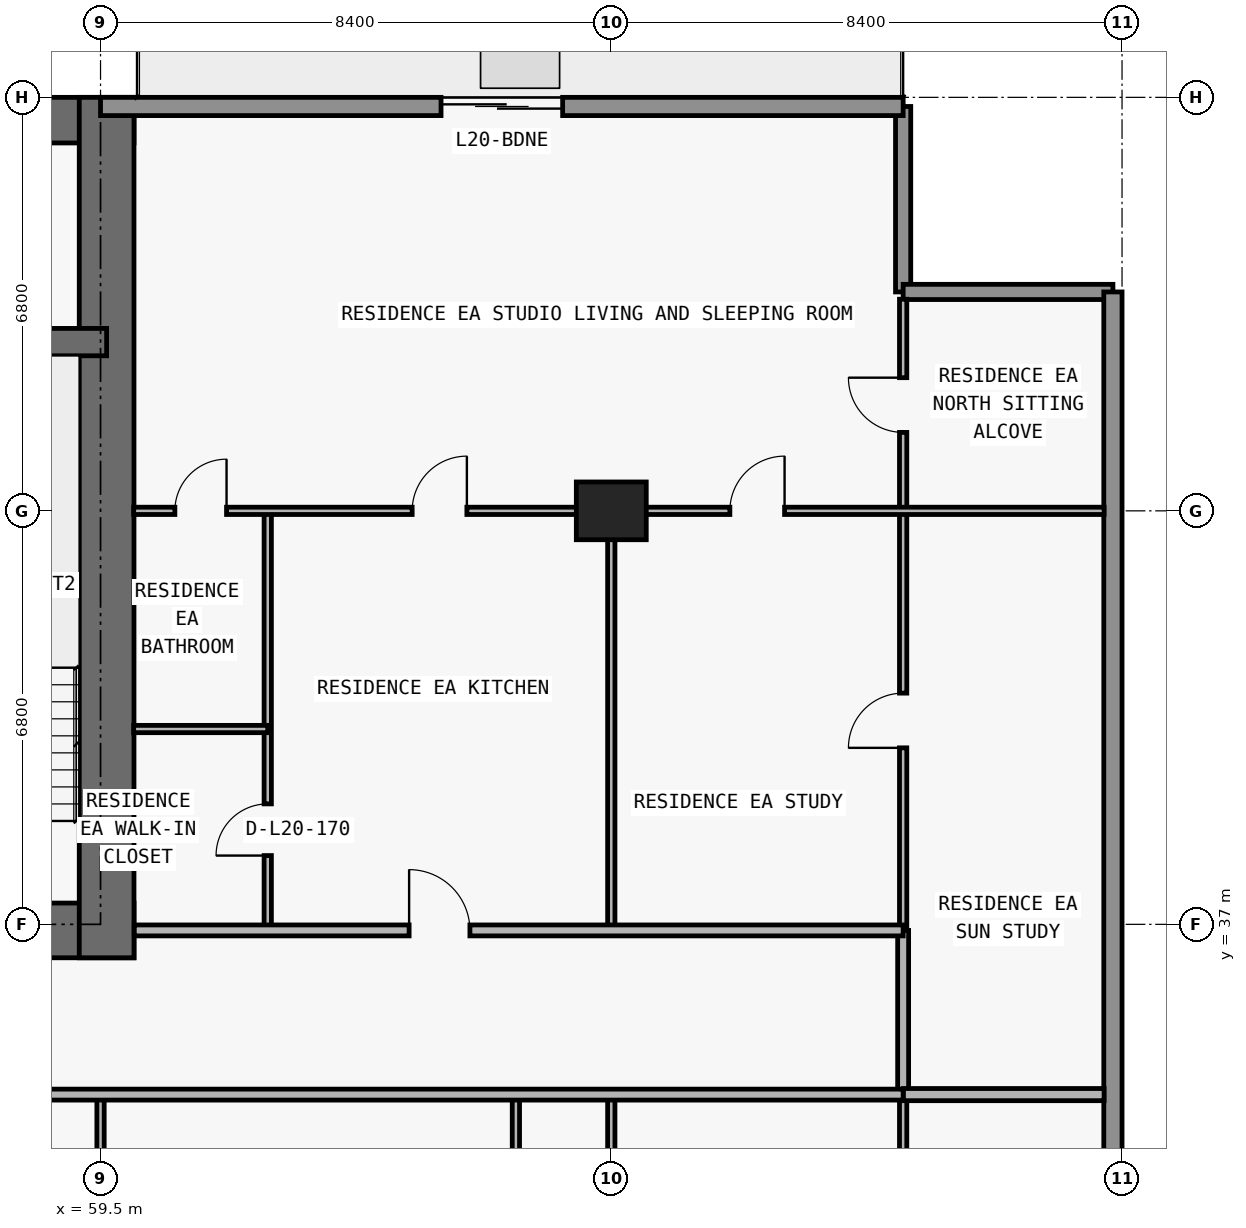
"""IFC4 building model, lengths in metres.
Left out: names, types, materials, properties, quantities, classifications, styles, units other than length and angle.
Written with IfcOpenShell. Run it as: python <this file> out.ifc"""

import sys

from ifc_helpers import new_model, si_unit, direction, frame, frame_2d, origin, origin_2d, place, context, subcontext, project, spatial, rectangle, extrude, element, fill, save


model = new_model("IFC4")
c1 = context("Model", 3, precision=1e-05, world=origin(), true_north=direction((0.0, 1.0)))
c2 = subcontext(c1, "Body", "Model", "MODEL_VIEW")
j1 = project(units=[si_unit("LENGTHUNIT", "METRE"), si_unit("PLANEANGLEUNIT", "RADIAN")], contexts=[c1])
p1 = place(None, origin())
s1 = spatial("IfcSite", under=j1, at=p1, CompositionType="ELEMENT")
p2 = place(p1, origin())
s2 = spatial("IfcBuilding", under=s1, at=p2, CompositionType="ELEMENT")
p3 = place(p2, frame((0.0, 0.0, 76.2)))
s3 = spatial("IfcBuildingStorey", under=s2, at=p3, CompositionType="ELEMENT", Elevation=76.2)
p4 = place(p3, frame((67.9, 43.8, 0.0), z_axis=(0.0, 0.0, 1.0), x_axis=(1.0, 0.0, 0.0)))
e1 = element("IfcColumn", 1, at=p4, inside=s3, PredefinedType="COLUMN", context=c2, shape_type="SweptSolid", body=[
    extrude(rectangle(XDim=1.15, YDim=0.95, at=origin_2d()), origin(), (0.0, 0.0, 1.0), 3.0),
])
p5 = place(p3, frame((17.75, 36.9, 0.0), z_axis=(0.0, 0.0, 1.0), x_axis=(1.0, 0.0, 0.0)))
e2 = element("IfcWall", 2, at=p5, inside=s3, PredefinedType="SHEAR", context=c2, shape_type="SweptSolid", body=[
    extrude(rectangle(XDim=42.3, YDim=0.9, at=frame_2d((21.15, 0.0))), origin(), (0.0, 0.0, 1.0), 3.0),
])
p6 = place(p5, frame((14.55, 0.0, 0.0)))
e3 = element("IfcOpeningElement", 3, at=p6, cuts=e2, PredefinedType="OPENING", context=c2, shape_type="SweptSolid", body=[
    extrude(rectangle(XDim=1.1, YDim=2.15, at=frame_2d((0.55, 1.075))), frame((0.0, 0.46, 0.0), z_axis=(0.0, -1.0, 0.0), x_axis=(1.0, 0.0, 0.0)), (0.0, 0.0, 1.0), 0.92),
])
p7 = place(p5, frame((6.4, 0.0, 0.0)))
e4 = element("IfcOpeningElement", 4, at=p7, cuts=e2, PredefinedType="OPENING", context=c2, shape_type="SweptSolid", body=[
    extrude(rectangle(XDim=1.05, YDim=2.15, at=frame_2d((0.525, 1.075))), frame((0.0, 0.46, 0.0), z_axis=(0.0, -1.0, 0.0), x_axis=(1.0, 0.0, 0.0)), (0.0, 0.0, 1.0), 0.92),
])
p8 = place(p5, frame((34.9, 0.0, 0.0)))
e5 = element("IfcOpeningElement", 5, at=p8, cuts=e2, PredefinedType="OPENING", context=c2, shape_type="SweptSolid", body=[
    extrude(rectangle(XDim=1.05, YDim=2.15, at=frame_2d((0.525, 1.075))), frame((0.0, 0.46, 0.0), z_axis=(0.0, -1.0, 0.0), x_axis=(1.0, 0.0, 0.0)), (0.0, 0.0, 1.0), 0.92),
])
p9 = place(p5, frame((11.012, 0.0, 0.0)))
e6 = element("IfcOpeningElement", 6, at=p9, cuts=e2, PredefinedType="OPENING", context=c2, shape_type="SweptSolid", body=[
    extrude(rectangle(XDim=1.05, YDim=2.15, at=frame_2d((0.525, 1.075))), frame((0.0, 0.46, 0.0), z_axis=(0.0, -1.0, 0.0), x_axis=(1.0, 0.0, 0.0)), (0.0, 0.0, 1.0), 0.92),
])
p10 = place(p5, frame((24.25, 0.0, 0.0)))
e7 = element("IfcOpeningElement", 7, at=p10, cuts=e2, PredefinedType="OPENING", context=c2, shape_type="SweptSolid", body=[
    extrude(rectangle(XDim=1.05, YDim=2.15, at=frame_2d((0.525, 1.075))), frame((0.0, 0.46, 0.0), z_axis=(0.0, -1.0, 0.0), x_axis=(1.0, 0.0, 0.0)), (0.0, 0.0, 1.0), 0.92),
])
p11 = place(p3, frame((17.75, 50.225, 0.0), z_axis=(0.0, 0.0, 1.0), x_axis=(1.0, 0.0, 0.0)))
e8 = element("IfcWall", 8, at=p11, inside=s3, PredefinedType="SHEAR", context=c2, shape_type="SweptSolid", body=[
    extrude(rectangle(XDim=42.3, YDim=0.75, at=frame_2d((21.15, 0.0))), origin(), (0.0, 0.0, 1.0), 3.0),
])
p12 = place(p3, frame((59.6, 36.45, 0.0), z_axis=(0.0, 0.0, 1.0), x_axis=(0.0, 1.0, 0.0)))
e9 = element("IfcWall", 9, at=p12, inside=s3, PredefinedType="SHEAR", context=c2, shape_type="SweptSolid", body=[
    extrude(rectangle(XDim=14.15, YDim=0.9, at=frame_2d((7.075, 0.0))), origin(), (0.0, 0.0, 1.0), 3.0),
])
p13 = place(p3, frame((18.2, 46.575, 0.0), z_axis=(0.0, 0.0, 1.0), x_axis=(1.0, 0.0, 0.0)))
e10 = element("IfcWall", 10, at=p13, inside=s3, PredefinedType="SHEAR", context=c2, shape_type="SweptSolid", body=[
    extrude(rectangle(XDim=41.4, YDim=0.45, at=frame_2d((20.7, 0.0))), origin(), (0.0, 0.0, 1.0), 3.0),
])
p14 = place(p13, frame((7.7, 0.0, 0.0)))
e11 = element("IfcOpeningElement", 11, at=p14, cuts=e10, PredefinedType="OPENING", context=c2, shape_type="SweptSolid", body=[
    extrude(rectangle(XDim=1.0, YDim=2.2, at=frame_2d((0.5, 1.1))), frame((0.0, 0.235, 0.0), z_axis=(0.0, -1.0, 0.0), x_axis=(1.0, 0.0, 0.0)), (0.0, 0.0, 1.0), 0.47),
])
p15 = place(p13, frame((32.725, 0.0, 0.0)))
e12 = element("IfcOpeningElement", 12, at=p15, cuts=e10, PredefinedType="OPENING", context=c2, shape_type="SweptSolid", body=[
    extrude(rectangle(XDim=1.05, YDim=2.15, at=frame_2d((0.525, 1.075))), frame((0.0, 0.235, 0.0), z_axis=(0.0, -1.0, 0.0), x_axis=(1.0, 0.0, 0.0)), (0.0, 0.0, 1.0), 0.47),
])
p16 = place(p3, frame((72.7, 50.45, 0.0), z_axis=(0.0, 0.0, 1.0), x_axis=(0.0, -1.0, 0.0)))
e13 = element("IfcWall", 13, at=p16, inside=s3, PredefinedType="ELEMENTEDWALL", context=c2, shape_type="SweptSolid", body=[
    extrude(rectangle(XDim=3.05, YDim=0.25, at=frame_2d((1.525, 0.0))), origin(), (0.0, 0.0, 1.0), 3.0),
])
p17 = place(p3, frame((72.7, 47.4, 0.0), z_axis=(0.0, 0.0, 1.0), x_axis=(1.0, 0.0, 0.0)))
e14 = element("IfcWall", 14, at=p17, inside=s3, PredefinedType="ELEMENTEDWALL", context=c2, shape_type="SweptSolid", body=[
    extrude(rectangle(XDim=3.45, YDim=0.25, at=frame_2d((1.725, 0.0))), origin(), (0.0, 0.0, 1.0), 3.0),
])
p18 = place(p3, frame((76.15, 47.4, 0.0), z_axis=(0.0, 0.0, 1.0), x_axis=(0.0, -1.0, 0.0)))
e15 = element("IfcWall", 15, at=p18, inside=s3, PredefinedType="STANDARD", context=c2, shape_type="SweptSolid", body=[
    extrude(rectangle(XDim=20.6, YDim=0.3, at=frame_2d((10.3, 0.0))), origin(), (0.0, 0.0, 1.0), 3.0),
])
p19 = place(p3, frame((59.5, 50.45, 0.0), z_axis=(0.0, 0.0, 1.0), x_axis=(1.0, 0.0, 0.0)))
e16 = element("IfcWall", 16, at=p19, inside=s3, PredefinedType="STANDARD", context=c2, shape_type="SweptSolid", body=[
    extrude(rectangle(XDim=13.2, YDim=0.3, at=frame_2d((6.6, 0.0))), origin(), (0.0, 0.0, 1.0), 3.0),
])
p20 = place(p19, frame((5.6, 0.0, 0.0)))
e17 = element("IfcOpeningElement", 17, at=p20, cuts=e16, PredefinedType="OPENING", context=c2, shape_type="SweptSolid", body=[
    extrude(rectangle(XDim=2.0, YDim=2.3, at=frame_2d((1.0, 1.15))), frame((0.0, 0.16, 0.0), z_axis=(0.0, -1.0, 0.0), x_axis=(1.0, 0.0, 0.0)), (0.0, 0.0, 1.0), 0.32),
])
p21 = place(p3, frame((59.5, 6.24, 0.0), z_axis=(0.0, 0.0, 1.0), x_axis=(0.0, 1.0, 0.0)))
e18 = element("IfcWall", 18, at=p21, inside=s3, PredefinedType="PARTITIONING", context=c2, shape_type="SweptSolid", body=[
    extrude(rectangle(XDim=27.96, YDim=0.12, at=frame_2d((13.98, 0.0))), origin(), (0.0, 0.0, 1.0), 2.06),
])
p22 = place(p21, frame((19.19, 0.0, 0.0)))
e19 = element("IfcOpeningElement", 19, at=p22, cuts=e18, PredefinedType="OPENING", context=c2, shape_type="SweptSolid", body=[
    extrude(rectangle(XDim=0.9, YDim=2.01, at=frame_2d((0.45, 1.005))), frame((0.0, 0.07, 0.0), z_axis=(0.0, -1.0, 0.0), x_axis=(1.0, 0.0, 0.0)), (0.0, 0.0, 1.0), 0.14),
])
p23 = place(p3, frame((62.25, 36.9, 0.0), z_axis=(0.0, 0.0, 1.0), x_axis=(0.0, 1.0, 0.0)))
e20 = element("IfcWall", 20, at=p23, inside=s3, PredefinedType="PARTITIONING", context=c2, shape_type="SweptSolid", body=[
    extrude(rectangle(XDim=6.9, YDim=0.12, at=frame_2d((3.45, 0.0))), origin(), (0.0, 0.0, 1.0), 2.436),
])
p24 = place(p23, frame((1.231, 0.0, 0.0)))
e21 = element("IfcOpeningElement", 21, at=p24, cuts=e20, PredefinedType="OPENING", context=c2, shape_type="SweptSolid", body=[
    extrude(rectangle(XDim=0.85, YDim=2.1, at=frame_2d((0.425, 1.05))), frame((0.0, 0.07, 0.0), z_axis=(0.0, -1.0, 0.0), x_axis=(1.0, 0.0, 0.0)), (0.0, 0.0, 1.0), 0.14),
])
p25 = place(p3, frame((66.331, 28.08, 0.0), z_axis=(0.0, 0.0, 1.0), x_axis=(0.0, 1.0, 0.0)))
e22 = element("IfcWall", 22, at=p25, inside=s3, PredefinedType="PARTITIONING", context=c2, shape_type="SweptSolid", body=[
    extrude(rectangle(XDim=6.12, YDim=0.12, at=frame_2d((3.06, 0.0))), origin(), (0.0, 0.0, 1.0), 3.0),
])
p26 = place(p25, frame((2.635, 0.0, 0.0)))
e23 = element("IfcOpeningElement", 23, at=p26, cuts=e22, PredefinedType="OPENING", context=c2, shape_type="SweptSolid", body=[
    extrude(rectangle(XDim=0.85, YDim=2.1, at=frame_2d((0.425, 1.05))), frame((0.0, 0.07, 0.0), z_axis=(0.0, -1.0, 0.0), x_axis=(1.0, 0.0, 0.0)), (0.0, 0.0, 1.0), 0.14),
])
p27 = place(p3, frame((67.9, 6.24, 0.0), z_axis=(0.0, 0.0, 1.0), x_axis=(0.0, 1.0, 0.0)))
e24 = element("IfcWall", 24, at=p27, inside=s3, PredefinedType="PARTITIONING", context=c2, shape_type="SweptSolid", body=[
    extrude(rectangle(XDim=27.96, YDim=0.12, at=frame_2d((13.98, 0.0))), origin(), (0.0, 0.0, 1.0), 2.06),
])
p28 = place(p27, frame((19.19, 0.0, 0.0)))
e25 = element("IfcOpeningElement", 25, at=p28, cuts=e24, PredefinedType="OPENING", context=c2, shape_type="SweptSolid", body=[
    extrude(rectangle(XDim=0.9, YDim=2.01, at=frame_2d((0.45, 1.005))), frame((0.0, 0.07, 0.0), z_axis=(0.0, -1.0, 0.0), x_axis=(1.0, 0.0, 0.0)), (0.0, 0.0, 1.0), 0.14),
])
p29 = place(p3, frame((67.9, 36.9, 0.0), z_axis=(0.0, 0.0, 1.0), x_axis=(0.0, 1.0, 0.0)))
e26 = element("IfcWall", 26, at=p29, inside=s3, PredefinedType="PARTITIONING", context=c2, shape_type="SweptSolid", body=[
    extrude(rectangle(XDim=6.9, YDim=0.12, at=frame_2d((3.45, 0.0))), origin(), (0.0, 0.0, 1.0), 2.06),
])
p30 = place(p3, frame((72.7, 6.32, 0.0), z_axis=(0.0, 0.0, 1.0), x_axis=(0.0, 1.0, 0.0)))
e27 = element("IfcWall", 27, at=p30, inside=s3, PredefinedType="PARTITIONING", context=c2, shape_type="SweptSolid", body=[
    extrude(rectangle(XDim=27.88, YDim=0.12, at=frame_2d((13.94, 0.0))), origin(), (0.0, 0.0, 1.0), 3.0),
])
p31 = place(p30, frame((13.49, 0.0, 0.0)))
e28 = element("IfcOpeningElement", 28, at=p31, cuts=e27, PredefinedType="OPENING", context=c2, shape_type="SweptSolid", body=[
    extrude(rectangle(XDim=0.9, YDim=2.15, at=frame_2d((0.45, 1.075))), frame((0.0, 0.07, 0.0), z_axis=(0.0, -1.0, 0.0), x_axis=(1.0, 0.0, 0.0)), (0.0, 0.0, 1.0), 0.14),
])
p32 = place(p3, frame((72.7, 34.205, 0.0), z_axis=(0.0, 0.0, 1.0), x_axis=(0.0, 1.0, 0.0)))
e29 = element("IfcWall", 29, at=p32, inside=s3, PredefinedType="PARTITIONING", context=c2, shape_type="SweptSolid", body=[
    extrude(rectangle(XDim=2.695, YDim=0.18, at=frame_2d((1.347, 0.0))), origin(), (0.0, 0.0, 1.0), 3.0),
])
p33 = place(p3, frame((72.7, 36.905, 0.0), z_axis=(0.0, 0.0, 1.0), x_axis=(0.0, 1.0, 0.0)))
e30 = element("IfcWall", 30, at=p33, inside=s3, PredefinedType="PARTITIONING", context=c2, shape_type="SweptSolid", body=[
    extrude(rectangle(XDim=10.375, YDim=0.12, at=frame_2d((5.188, 0.0))), origin(), (0.0, 0.0, 1.0), 3.0),
])
p34 = place(p33, frame((2.998, 0.0, 0.0)))
e31 = element("IfcOpeningElement", 31, at=p34, cuts=e30, PredefinedType="OPENING", context=c2, shape_type="SweptSolid", body=[
    extrude(rectangle(XDim=0.9, YDim=2.15, at=frame_2d((0.45, 1.075))), frame((0.0, 0.07, 0.0), z_axis=(0.0, -1.0, 0.0), x_axis=(1.0, 0.0, 0.0)), (0.0, 0.0, 1.0), 0.14),
])
p35 = place(p33, frame((8.185, 0.0, 0.0)))
e32 = element("IfcOpeningElement", 32, at=p35, cuts=e30, PredefinedType="OPENING", context=c2, shape_type="SweptSolid", body=[
    extrude(rectangle(XDim=0.9, YDim=2.15, at=frame_2d((0.45, 1.075))), frame((0.0, 0.07, 0.0), z_axis=(0.0, -1.0, 0.0), x_axis=(1.0, 0.0, 0.0)), (0.0, 0.0, 1.0), 0.14),
])
p36 = place(p3, frame((5.105, 34.2, 0.0), z_axis=(0.0, 0.0, 1.0), x_axis=(1.0, 0.0, 0.0)))
e33 = element("IfcWall", 33, at=p36, inside=s3, PredefinedType="PARTITIONING", context=c2, shape_type="SweptSolid", body=[
    extrude(rectangle(XDim=67.595, YDim=0.18, at=frame_2d((33.797, 0.0))), origin(), (0.0, 0.0, 1.0), 3.0),
])
p37 = place(p36, frame((7.639, 0.0, 0.0)))
e34 = element("IfcOpeningElement", 34, at=p37, cuts=e33, PredefinedType="OPENING", context=c2, shape_type="SweptSolid", body=[
    extrude(rectangle(XDim=1.0, YDim=2.2, at=frame_2d((0.5, 1.1))), frame((0.0, 0.1, 0.0), z_axis=(0.0, -1.0, 0.0), x_axis=(1.0, 0.0, 0.0)), (0.0, 0.0, 1.0), 0.2),
])
p38 = place(p36, frame((24.423, 0.0, 0.0)))
e35 = element("IfcOpeningElement", 35, at=p38, cuts=e33, PredefinedType="OPENING", context=c2, shape_type="SweptSolid", body=[
    extrude(rectangle(XDim=1.0, YDim=2.2, at=frame_2d((0.5, 1.1))), frame((0.0, 0.1, 0.0), z_axis=(0.0, -1.0, 0.0), x_axis=(1.0, 0.0, 0.0)), (0.0, 0.0, 1.0), 0.2),
])
p39 = place(p36, frame((48.825, 0.0, 0.0)))
e36 = element("IfcOpeningElement", 36, at=p39, cuts=e33, PredefinedType="OPENING", context=c2, shape_type="SweptSolid", body=[
    extrude(rectangle(XDim=1.0, YDim=2.2, at=frame_2d((0.5, 1.1))), frame((0.0, 0.1, 0.0), z_axis=(0.0, -1.0, 0.0), x_axis=(1.0, 0.0, 0.0)), (0.0, 0.0, 1.0), 0.2),
])
p40 = place(p3, frame((72.705, 34.2, 0.0), z_axis=(0.0, 0.0, 1.0), x_axis=(1.0, 0.0, 0.0)))
e37 = element("IfcWall", 37, at=p40, inside=s3, PredefinedType="PARTITIONING", context=c2, shape_type="SweptSolid", body=[
    extrude(rectangle(XDim=3.3, YDim=0.2, at=frame_2d((1.65, 0.0))), origin(), (0.0, 0.0, 1.0), 3.0),
])
p41 = place(p3, frame((60.055, 36.9, 0.0), z_axis=(0.0, 0.0, 1.0), x_axis=(1.0, 0.0, 0.0)))
e38 = element("IfcWall", 38, at=p41, inside=s3, PredefinedType="PARTITIONING", context=c2, shape_type="SweptSolid", body=[
    extrude(rectangle(XDim=12.645, YDim=0.18, at=frame_2d((6.323, 0.0))), origin(), (0.0, 0.0, 1.0), 3.0),
])
p42 = place(p41, frame((4.52, 0.0, 0.0)))
e39 = element("IfcOpeningElement", 39, at=p42, cuts=e38, PredefinedType="OPENING", context=c2, shape_type="SweptSolid", body=[
    extrude(rectangle(XDim=1.0, YDim=2.2, at=frame_2d((0.5, 1.1))), frame((0.0, 0.1, 0.0), z_axis=(0.0, -1.0, 0.0), x_axis=(1.0, 0.0, 0.0)), (0.0, 0.0, 1.0), 0.2),
])
p43 = place(p3, frame((60.045, 40.212, 0.0), z_axis=(0.0, 0.0, 1.0), x_axis=(1.0, 0.0, 0.0)))
e40 = element("IfcWall", 40, at=p43, inside=s3, PredefinedType="PARTITIONING", context=c2, shape_type="SweptSolid", body=[
    extrude(rectangle(XDim=2.205, YDim=0.12, at=frame_2d((1.103, 0.0))), origin(), (0.0, 0.0, 1.0), 3.0),
])
p44 = place(p3, frame((60.045, 43.8, 0.0), z_axis=(0.0, 0.0, 1.0), x_axis=(1.0, 0.0, 0.0)))
e41 = element("IfcWall", 41, at=p44, inside=s3, PredefinedType="PARTITIONING", context=c2, shape_type="SweptSolid", body=[
    extrude(rectangle(XDim=15.96, YDim=0.12, at=frame_2d((7.98, 0.0))), origin(), (0.0, 0.0, 1.0), 2.289),
])
p45 = place(p44, frame((9.805, 0.0, 0.0)))
e42 = element("IfcOpeningElement", 42, at=p45, cuts=e41, PredefinedType="OPENING", context=c2, shape_type="SweptSolid", body=[
    extrude(rectangle(XDim=0.9, YDim=2.15, at=frame_2d((0.45, 1.075))), frame((0.0, 0.07, 0.0), z_axis=(0.0, -1.0, 0.0), x_axis=(1.0, 0.0, 0.0)), (0.0, 0.0, 1.0), 0.14),
])
p46 = place(p44, frame((4.58, 0.0, 0.0)))
e43 = element("IfcOpeningElement", 43, at=p46, cuts=e41, PredefinedType="OPENING", context=c2, shape_type="SweptSolid", body=[
    extrude(rectangle(XDim=0.9, YDim=2.15, at=frame_2d((0.45, 1.075))), frame((0.0, 0.07, 0.0), z_axis=(0.0, -1.0, 0.0), x_axis=(1.0, 0.0, 0.0)), (0.0, 0.0, 1.0), 0.14),
])
p47 = place(p44, frame((0.677, 0.0, 0.0)))
e44 = element("IfcOpeningElement", 44, at=p47, cuts=e41, PredefinedType="OPENING", context=c2, shape_type="SweptSolid", body=[
    extrude(rectangle(XDim=0.85, YDim=2.1, at=frame_2d((0.425, 1.05))), frame((0.0, 0.07, 0.0), z_axis=(0.0, -1.0, 0.0), x_axis=(1.0, 0.0, 0.0)), (0.0, 0.0, 1.0), 0.14),
])
p48 = place(p20, origin())
e45 = element("IfcDoor", 45, at=p48, inside=s3, OperationType="DOUBLE_DOOR_SLIDING", PredefinedType="DOOR", context=c2, shape_type="SweptSolid", body=[
    extrude(rectangle(XDim=2.0, YDim=2.3, at=frame_2d((1.0, 1.15))), frame((0.0, 0.025, 0.0), z_axis=(0.0, -1.0, 0.0), x_axis=(1.0, 0.0, 0.0)), (0.0, 0.0, 1.0), 0.05),
])
fill(e17, e45)
p49 = place(p45, origin())
e46 = element("IfcDoor", 46, at=p49, inside=s3, OperationType="SINGLE_SWING_RIGHT", PredefinedType="DOOR", context=c2, shape_type="SweptSolid", body=[
    extrude(rectangle(XDim=0.9, YDim=2.15, at=frame_2d((0.45, 1.075))), frame((0.0, 0.025, 0.0), z_axis=(0.0, -1.0, 0.0), x_axis=(1.0, 0.0, 0.0)), (0.0, 0.0, 1.0), 0.05),
])
fill(e42, e46)
p50 = place(p42, origin())
e47 = element("IfcDoor", 47, at=p50, inside=s3, OperationType="SINGLE_SWING_LEFT", PredefinedType="DOOR", context=c2, shape_type="SweptSolid", body=[
    extrude(rectangle(XDim=1.0, YDim=2.2, at=frame_2d((0.5, 1.1))), frame((0.0, 0.025, 0.0), z_axis=(0.0, -1.0, 0.0), x_axis=(1.0, 0.0, 0.0)), (0.0, 0.0, 1.0), 0.05),
])
fill(e39, e47)
p51 = place(p46, origin())
e48 = element("IfcDoor", 48, at=p51, inside=s3, OperationType="SINGLE_SWING_RIGHT", PredefinedType="DOOR", context=c2, shape_type="SweptSolid", body=[
    extrude(rectangle(XDim=0.9, YDim=2.15, at=frame_2d((0.45, 1.075))), frame((0.0, 0.025, 0.0), z_axis=(0.0, -1.0, 0.0), x_axis=(1.0, 0.0, 0.0)), (0.0, 0.0, 1.0), 0.05),
])
fill(e43, e48)
p52 = place(p24, origin())
e49 = element("IfcDoor", 49, at=p52, inside=s3, OperationType="SINGLE_SWING_LEFT", PredefinedType="DOOR", context=c2, shape_type="SweptSolid", body=[
    extrude(rectangle(XDim=0.85, YDim=2.1, at=frame_2d((0.425, 1.05))), frame((0.0, 0.025, 0.0), z_axis=(0.0, -1.0, 0.0), x_axis=(1.0, 0.0, 0.0)), (0.0, 0.0, 1.0), 0.05),
])
fill(e21, e49)
p53 = place(p47, origin())
e50 = element("IfcDoor", 50, at=p53, inside=s3, OperationType="SINGLE_SWING_RIGHT", PredefinedType="DOOR", context=c2, shape_type="SweptSolid", body=[
    extrude(rectangle(XDim=0.85, YDim=2.1, at=frame_2d((0.425, 1.05))), frame((0.0, 0.025, 0.0), z_axis=(0.0, -1.0, 0.0), x_axis=(1.0, 0.0, 0.0)), (0.0, 0.0, 1.0), 0.05),
])
fill(e44, e50)
p54 = place(p34, origin())
e51 = element("IfcDoor", 51, at=p54, inside=s3, OperationType="SINGLE_SWING_LEFT", PredefinedType="DOOR", context=c2, shape_type="SweptSolid", body=[
    extrude(rectangle(XDim=0.9, YDim=2.15, at=frame_2d((0.45, 1.075))), frame((0.0, 0.025, 0.0), z_axis=(0.0, -1.0, 0.0), x_axis=(1.0, 0.0, 0.0)), (0.0, 0.0, 1.0), 0.05),
])
fill(e31, e51)
p55 = place(p35, origin())
e52 = element("IfcDoor", 52, at=p55, inside=s3, OperationType="SINGLE_SWING_RIGHT", PredefinedType="DOOR", context=c2, shape_type="SweptSolid", body=[
    extrude(rectangle(XDim=0.9, YDim=2.15, at=frame_2d((0.45, 1.075))), frame((0.0, 0.025, 0.0), z_axis=(0.0, -1.0, 0.0), x_axis=(1.0, 0.0, 0.0)), (0.0, 0.0, 1.0), 0.05),
])
fill(e32, e52)
save(model, sys.argv[1])
